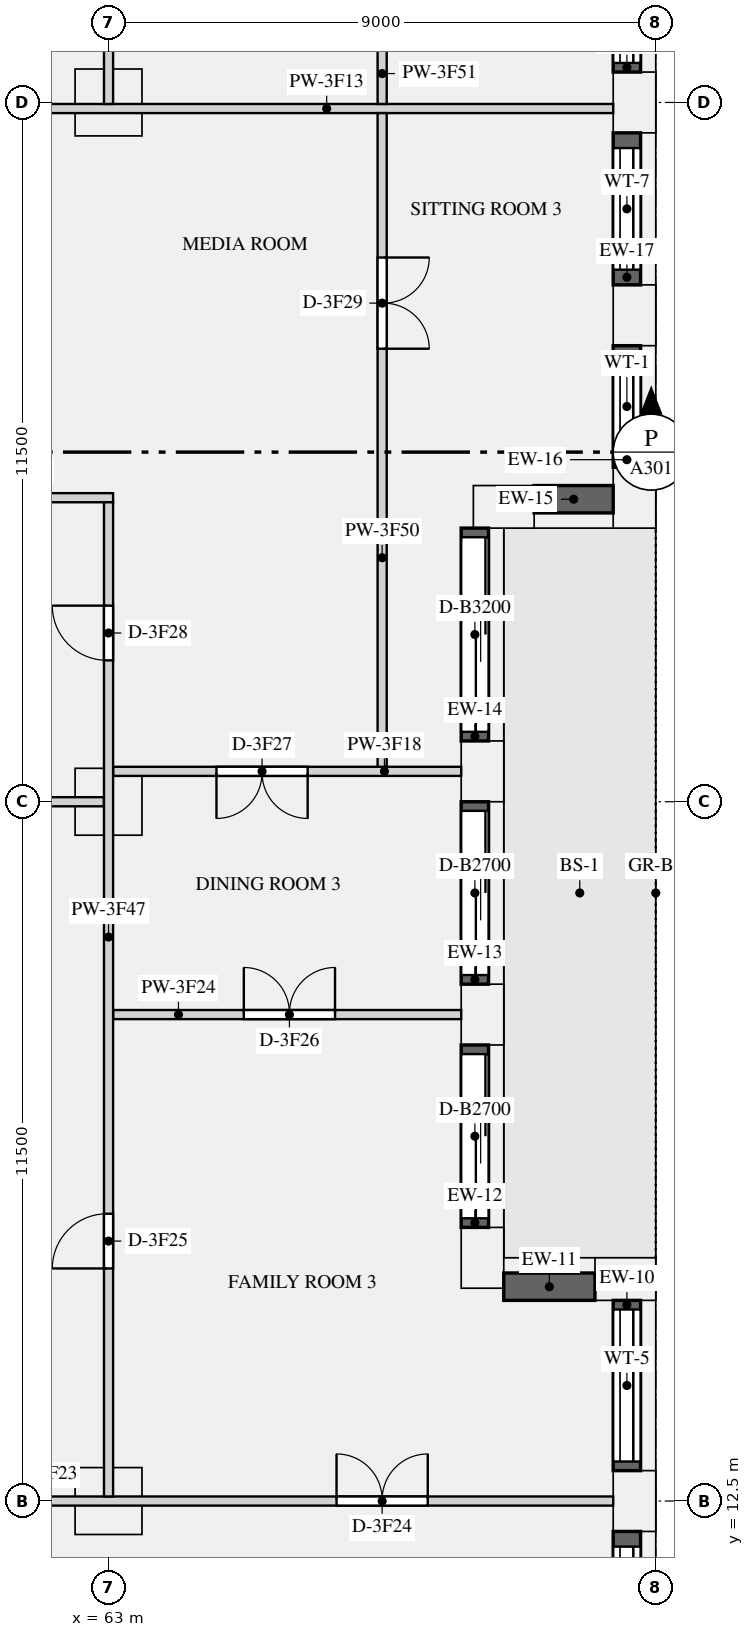
"""IFC4 building model, lengths in metres.
Left out: names, types, materials, properties, quantities, classifications, styles, units other than length and angle.
Written with IfcOpenShell. Run it as: python <this file> out.ifc"""

import sys

from ifc_helpers import new_model, si_unit, direction, frame, frame_2d, origin, origin_2d, place, context, subcontext, project, spatial, rectangle, extrude, element, fill, save


model = new_model("IFC4")
c1 = context("Model", 3, precision=1e-05, world=origin(), true_north=direction((0.0, 1.0)))
c2 = subcontext(c1, "Body", "Model", "MODEL_VIEW")
j1 = project(units=[si_unit("LENGTHUNIT", "METRE"), si_unit("PLANEANGLEUNIT", "RADIAN")], contexts=[c1])
p1 = place(None, origin())
s1 = spatial("IfcSite", under=j1, at=p1, CompositionType="ELEMENT")
p2 = place(p1, origin())
s2 = spatial("IfcBuilding", under=s1, at=p2, CompositionType="ELEMENT")
p3 = place(p2, frame((0.0, 0.0, 179.1)))
s3 = spatial("IfcBuildingStorey", under=s2, at=p3, CompositionType="ELEMENT", Elevation=179.1)
for number, where, z_axis, x_axis in (
    (1, (71.65, 12.5, 0.0), (0.0, 0.0, 1.0), (0.0, 1.0, 0.0)),
    (2, (71.5, 16.15, 0.0), (0.0, 0.0, 1.0), (-1.0, 0.0, 0.0)),
    (3, (69.15, 16.5, 0.0), (0.0, 0.0, 1.0), (0.0, 1.0, 0.0)),
    (4, (69.15, 20.5, 0.0), (0.0, 0.0, 1.0), (0.0, 1.0, 0.0)),
    (5, (69.15, 24.5, 0.0), (0.0, 0.0, 1.0), (0.0, 1.0, 0.0)),
    (6, (69.5, 28.85, 0.0), (0.0, 0.0, 1.0), (1.0, 0.0, 0.0)),
    (7, (71.65, 29.0, 0.0), (0.0, 0.0, 1.0), (0.0, 1.0, 0.0)),
    (8, (71.65, 32.0, 0.0), (0.0, 0.0, 1.0), (0.0, 1.0, 0.0)),
    (9, (71.65, 35.5, 0.0), (0.0, 0.0, 1.0), (0.0, 1.0, 0.0)),
):
    element("IfcColumn", number, at=place(p3, frame(where, z_axis=z_axis, x_axis=x_axis)), inside=s3, PredefinedType="USERDEFINED", context=c2, shape_type="SweptSolid", body=[
        extrude(rectangle(XDim=1.0, YDim=0.7, at=origin_2d()), origin(), (0.0, 0.0, 1.0), 3.15),
    ])
for number, where, z_axis, x_axis in (
    (10, (63.0, 24.0, 0.0), (0.0, 0.0, 1.0), (1.0, 0.0, 0.0)),
    (11, (63.0, 35.5, 0.0), (0.0, 0.0, 1.0), (1.0, 0.0, 0.0)),
    (12, (63.0, 12.5, 0.0), (0.0, 0.0, 1.0), (1.0, 0.0, 0.0)),
):
    element("IfcColumn", number, at=place(p3, frame(where, z_axis=z_axis, x_axis=x_axis)), inside=s3, PredefinedType="COLUMN", context=c2, shape_type="SweptSolid", body=[
        extrude(rectangle(XDim=1.1, YDim=1.1, at=origin_2d()), origin(), (0.0, 0.0, 1.0), 3.15),
    ])
p4 = place(p3, frame((71.525, 9.0, 0.9), z_axis=(0.0, 0.0, 1.0), x_axis=(0.0, 1.0, 0.0)))
e13 = element("IfcWall", 13, at=p4, inside=s3, PredefinedType="SOLIDWALL", context=c2, shape_type="SweptSolid", body=[
    extrude(rectangle(XDim=3.0, YDim=0.45, at=frame_2d((1.5, 0.0))), origin(), (0.0, 0.0, 1.0), 1.93),
])
p5 = place(p4, frame((0.25, 0.0, 0.15)))
e14 = element("IfcOpeningElement", 14, at=p5, cuts=e13, PredefinedType="OPENING", context=c2, shape_type="SweptSolid", body=[
    extrude(rectangle(XDim=2.5, YDim=1.5, at=frame_2d((1.25, 0.75))), frame((0.0, 0.235, 0.0), z_axis=(0.0, -1.0, 0.0), x_axis=(1.0, 0.0, 0.0)), (0.0, 0.0, 1.0), 0.47),
])
p6 = place(p3, frame((71.525, 13.0, 0.9), z_axis=(0.0, 0.0, 1.0), x_axis=(0.0, 1.0, 0.0)))
e15 = element("IfcWall", 15, at=p6, inside=s3, PredefinedType="SOLIDWALL", context=c2, shape_type="SweptSolid", body=[
    extrude(rectangle(XDim=2.8, YDim=0.45, at=frame_2d((1.4, 0.0))), origin(), (0.0, 0.0, 1.0), 1.93),
])
p7 = place(p6, frame((0.15, 0.0, 0.15)))
e16 = element("IfcOpeningElement", 16, at=p7, cuts=e15, PredefinedType="OPENING", context=c2, shape_type="SweptSolid", body=[
    extrude(rectangle(XDim=2.5, YDim=1.5, at=frame_2d((1.25, 0.75))), frame((0.0, 0.235, 0.0), z_axis=(0.0, -1.0, 0.0), x_axis=(1.0, 0.0, 0.0)), (0.0, 0.0, 1.0), 0.47),
])
p8 = place(p3, frame((71.0, 16.025, 0.9), z_axis=(0.0, 0.0, 1.0), x_axis=(-1.0, 0.0, 0.0)))
e17 = element("IfcWall", 17, at=p8, inside=s3, PredefinedType="SOLIDWALL", context=c2, shape_type="SweptSolid", body=[
    extrude(rectangle(XDim=1.5, YDim=0.45, at=frame_2d((0.75, 0.0))), origin(), (0.0, 0.0, 1.0), 1.93),
])
p9 = place(p3, frame((69.025, 17.0, 0.0), z_axis=(0.0, 0.0, 1.0), x_axis=(0.0, 1.0, 0.0)))
e18 = element("IfcWall", 18, at=p9, inside=s3, PredefinedType="SOLIDWALL", context=c2, shape_type="SweptSolid", body=[
    extrude(rectangle(XDim=3.0, YDim=0.45, at=frame_2d((1.5, 0.0))), origin(), (0.0, 0.0, 1.0), 2.83),
])
p10 = place(p9, frame((0.15, 0.0, 0.0)))
e19 = element("IfcOpeningElement", 19, at=p10, cuts=e18, PredefinedType="OPENING", context=c2, shape_type="SweptSolid", body=[
    extrude(rectangle(XDim=2.7, YDim=2.3, at=frame_2d((1.35, 1.15))), frame((0.0, 0.235, 0.0), z_axis=(0.0, -1.0, 0.0), x_axis=(1.0, 0.0, 0.0)), (0.0, 0.0, 1.0), 0.47),
])
p11 = place(p3, frame((69.025, 21.0, 0.0), z_axis=(0.0, 0.0, 1.0), x_axis=(0.0, 1.0, 0.0)))
e20 = element("IfcWall", 20, at=p11, inside=s3, PredefinedType="SOLIDWALL", context=c2, shape_type="SweptSolid", body=[
    extrude(rectangle(XDim=3.0, YDim=0.45, at=frame_2d((1.5, 0.0))), origin(), (0.0, 0.0, 1.0), 2.83),
])
p12 = place(p11, frame((0.15, 0.0, 0.0)))
e21 = element("IfcOpeningElement", 21, at=p12, cuts=e20, PredefinedType="OPENING", context=c2, shape_type="SweptSolid", body=[
    extrude(rectangle(XDim=2.7, YDim=2.3, at=frame_2d((1.35, 1.15))), frame((0.0, 0.235, 0.0), z_axis=(0.0, -1.0, 0.0), x_axis=(1.0, 0.0, 0.0)), (0.0, 0.0, 1.0), 0.47),
])
p13 = place(p3, frame((69.025, 25.0, 0.0), z_axis=(0.0, 0.0, 1.0), x_axis=(0.0, 1.0, 0.0)))
e22 = element("IfcWall", 22, at=p13, inside=s3, PredefinedType="SOLIDWALL", context=c2, shape_type="SweptSolid", body=[
    extrude(rectangle(XDim=3.5, YDim=0.45, at=frame_2d((1.75, 0.0))), origin(), (0.0, 0.0, 1.0), 2.83),
])
p14 = place(p13, frame((0.15, 0.0, 0.0)))
e23 = element("IfcOpeningElement", 23, at=p14, cuts=e22, PredefinedType="OPENING", context=c2, shape_type="SweptSolid", body=[
    extrude(rectangle(XDim=3.2, YDim=2.3, at=frame_2d((1.6, 1.15))), frame((0.0, 0.235, 0.0), z_axis=(0.0, -1.0, 0.0), x_axis=(1.0, 0.0, 0.0)), (0.0, 0.0, 1.0), 0.47),
])
p15 = place(p3, frame((70.0, 28.975, 0.9), z_axis=(0.0, 0.0, 1.0), x_axis=(1.0, 0.0, 0.0)))
e24 = element("IfcWall", 24, at=p15, inside=s3, PredefinedType="SOLIDWALL", context=c2, shape_type="SweptSolid", body=[
    extrude(rectangle(XDim=1.3, YDim=0.45, at=frame_2d((0.65, 0.0))), origin(), (0.0, 0.0, 1.0), 1.93),
])
p16 = place(p3, frame((71.525, 29.5, 0.9), z_axis=(0.0, 0.0, 1.0), x_axis=(0.0, 1.0, 0.0)))
e25 = element("IfcWall", 25, at=p16, inside=s3, PredefinedType="SOLIDWALL", context=c2, shape_type="SweptSolid", body=[
    extrude(rectangle(XDim=2.0, YDim=0.45, at=frame_2d((1.0, 0.0))), origin(), (0.0, 0.0, 1.0), 1.93),
])
p17 = place(p16, frame((0.25, 0.0, 0.15)))
e26 = element("IfcOpeningElement", 26, at=p17, cuts=e25, PredefinedType="OPENING", context=c2, shape_type="SweptSolid", body=[
    extrude(rectangle(XDim=1.5, YDim=1.5, at=frame_2d((0.75, 0.75))), frame((0.0, 0.235, 0.0), z_axis=(0.0, -1.0, 0.0), x_axis=(1.0, 0.0, 0.0)), (0.0, 0.0, 1.0), 0.47),
])
p18 = place(p3, frame((71.525, 32.5, 0.9), z_axis=(0.0, 0.0, 1.0), x_axis=(0.0, 1.0, 0.0)))
e27 = element("IfcWall", 27, at=p18, inside=s3, PredefinedType="SOLIDWALL", context=c2, shape_type="SweptSolid", body=[
    extrude(rectangle(XDim=2.5, YDim=0.45, at=frame_2d((1.25, 0.0))), origin(), (0.0, 0.0, 1.0), 1.93),
])
p19 = place(p18, frame((0.25, 0.0, 0.15)))
e28 = element("IfcOpeningElement", 28, at=p19, cuts=e27, PredefinedType="OPENING", context=c2, shape_type="SweptSolid", body=[
    extrude(rectangle(XDim=2.0, YDim=1.5, at=frame_2d((1.0, 0.75))), frame((0.0, 0.235, 0.0), z_axis=(0.0, -1.0, 0.0), x_axis=(1.0, 0.0, 0.0)), (0.0, 0.0, 1.0), 0.47),
])
p20 = place(p3, frame((71.525, 36.0, 0.9), z_axis=(0.0, 0.0, 1.0), x_axis=(0.0, 1.0, 0.0)))
e29 = element("IfcWall", 29, at=p20, inside=s3, PredefinedType="SOLIDWALL", context=c2, shape_type="SweptSolid", body=[
    extrude(rectangle(XDim=2.3, YDim=0.45, at=frame_2d((1.15, 0.0))), origin(), (0.0, 0.0, 1.0), 1.93),
])
p21 = place(p20, frame((0.15, 0.0, 0.15)))
e30 = element("IfcOpeningElement", 30, at=p21, cuts=e29, PredefinedType="OPENING", context=c2, shape_type="SweptSolid", body=[
    extrude(rectangle(XDim=2.0, YDim=1.5, at=frame_2d((1.0, 0.75))), frame((0.0, 0.235, 0.0), z_axis=(0.0, -1.0, 0.0), x_axis=(1.0, 0.0, 0.0)), (0.0, 0.0, 1.0), 0.47),
])
p22 = place(p3, frame((59.9, 24.0, 0.0), z_axis=(0.0, 0.0, 1.0), x_axis=(1.0, 0.0, 0.0)))
e31 = element("IfcWall", 31, at=p22, inside=s3, PredefinedType="PARTITIONING", context=c2, shape_type="SweptSolid", body=[
    extrude(rectangle(XDim=3.025, YDim=0.15, at=frame_2d((1.513, 0.0))), origin(), (0.0, 0.0, 1.0), 2.83),
])
p23 = place(p3, frame((59.8, 35.4, 0.0), z_axis=(0.0, 0.0, 1.0), x_axis=(1.0, 0.0, 0.0)))
e32 = element("IfcWall", 32, at=p23, inside=s3, PredefinedType="PARTITIONING", context=c2, shape_type="SweptSolid", body=[
    extrude(rectangle(XDim=11.5, YDim=0.15, at=frame_2d((5.75, 0.0))), origin(), (0.0, 0.0, 1.0), 2.83),
])
p24 = place(p23, frame((0.575, 0.0, 0.0)))
e33 = element("IfcOpeningElement", 33, at=p24, cuts=e32, PredefinedType="OPENING", context=c2, shape_type="SweptSolid", body=[
    extrude(rectangle(XDim=1.5, YDim=2.1, at=frame_2d((0.75, 1.05))), frame((0.0, 0.085, 0.0), z_axis=(0.0, -1.0, 0.0), x_axis=(1.0, 0.0, 0.0)), (0.0, 0.0, 1.0), 0.17),
])
p25 = place(p3, frame((63.075, 24.5, 0.0), z_axis=(0.0, 0.0, 1.0), x_axis=(1.0, 0.0, 0.0)))
e34 = element("IfcWall", 34, at=p25, inside=s3, PredefinedType="PARTITIONING", context=c2, shape_type="SweptSolid", body=[
    extrude(rectangle(XDim=5.725, YDim=0.15, at=frame_2d((2.863, 0.0))), origin(), (0.0, 0.0, 1.0), 2.83),
])
p26 = place(p25, frame((1.7, 0.0, 0.0)))
e35 = element("IfcOpeningElement", 35, at=p26, cuts=e34, PredefinedType="OPENING", context=c2, shape_type="SweptSolid", body=[
    extrude(rectangle(XDim=1.5, YDim=2.1, at=frame_2d((0.75, 1.05))), frame((0.0, 0.085, 0.0), z_axis=(0.0, -1.0, 0.0), x_axis=(1.0, 0.0, 0.0)), (0.0, 0.0, 1.0), 0.17),
])
p27 = place(p3, frame((54.0, 12.5, 0.0), z_axis=(0.0, 0.0, 1.0), x_axis=(1.0, 0.0, 0.0)))
e36 = element("IfcWall", 36, at=p27, inside=s3, PredefinedType="PARTITIONING", context=c2, shape_type="SweptSolid", body=[
    extrude(rectangle(XDim=17.3, YDim=0.15, at=frame_2d((8.65, 0.0))), origin(), (0.0, 0.0, 1.0), 2.83),
])
p28 = place(p27, frame((1.5, 0.0, 0.0)))
e37 = element("IfcOpeningElement", 37, at=p28, cuts=e36, PredefinedType="OPENING", context=c2, shape_type="SweptSolid", body=[
    extrude(rectangle(XDim=1.5, YDim=2.1, at=frame_2d((0.75, 1.05))), frame((0.0, 0.085, 0.0), z_axis=(0.0, -1.0, 0.0), x_axis=(1.0, 0.0, 0.0)), (0.0, 0.0, 1.0), 0.17),
])
p29 = place(p27, frame((12.75, 0.0, 0.0)))
e38 = element("IfcOpeningElement", 38, at=p29, cuts=e36, PredefinedType="OPENING", context=c2, shape_type="SweptSolid", body=[
    extrude(rectangle(XDim=1.5, YDim=2.1, at=frame_2d((0.75, 1.05))), frame((0.0, 0.085, 0.0), z_axis=(0.0, -1.0, 0.0), x_axis=(1.0, 0.0, 0.0)), (0.0, 0.0, 1.0), 0.17),
])
p30 = place(p3, frame((63.075, 20.5, 0.0), z_axis=(0.0, 0.0, 1.0), x_axis=(1.0, 0.0, 0.0)))
e39 = element("IfcWall", 39, at=p30, inside=s3, PredefinedType="PARTITIONING", context=c2, shape_type="SweptSolid", body=[
    extrude(rectangle(XDim=5.725, YDim=0.15, at=frame_2d((2.863, 0.0))), origin(), (0.0, 0.0, 1.0), 2.83),
])
p31 = place(p30, frame((2.15, 0.0, 0.0)))
e40 = element("IfcOpeningElement", 40, at=p31, cuts=e39, PredefinedType="OPENING", context=c2, shape_type="SweptSolid", body=[
    extrude(rectangle(XDim=1.5, YDim=2.1, at=frame_2d((0.75, 1.05))), frame((0.0, 0.085, 0.0), z_axis=(0.0, -1.0, 0.0), x_axis=(1.0, 0.0, 0.0)), (0.0, 0.0, 1.0), 0.17),
])
p32 = place(p3, frame((59.8, 29.0, 0.0), z_axis=(0.0, 0.0, 1.0), x_axis=(1.0, 0.0, 0.0)))
e41 = element("IfcWall", 41, at=p32, inside=s3, PredefinedType="PARTITIONING", context=c2, shape_type="SweptSolid", body=[
    extrude(rectangle(XDim=3.275, YDim=0.15, at=frame_2d((1.637, 0.0))), origin(), (0.0, 0.0, 1.0), 2.83),
])
p33 = place(p3, frame((63.0, 12.575, 0.0), z_axis=(0.0, 0.0, 1.0), x_axis=(0.0, 1.0, 0.0)))
e42 = element("IfcWall", 42, at=p33, inside=s3, PredefinedType="PARTITIONING", context=c2, shape_type="SweptSolid", body=[
    extrude(rectangle(XDim=16.35, YDim=0.15, at=frame_2d((8.175, 0.0))), origin(), (0.0, 0.0, 1.0), 2.83),
])
p34 = place(p33, frame((3.75, 0.0, 0.0)))
e43 = element("IfcOpeningElement", 43, at=p34, cuts=e42, PredefinedType="OPENING", context=c2, shape_type="SweptSolid", body=[
    extrude(rectangle(XDim=0.9, YDim=2.1, at=frame_2d((0.45, 1.05))), frame((0.0, 0.085, 0.0), z_axis=(0.0, -1.0, 0.0), x_axis=(1.0, 0.0, 0.0)), (0.0, 0.0, 1.0), 0.17),
])
p35 = place(p33, frame((13.75, 0.0, 0.0)))
e44 = element("IfcOpeningElement", 44, at=p35, cuts=e42, PredefinedType="OPENING", context=c2, shape_type="SweptSolid", body=[
    extrude(rectangle(XDim=0.9, YDim=2.1, at=frame_2d((0.45, 1.05))), frame((0.0, 0.085, 0.0), z_axis=(0.0, -1.0, 0.0), x_axis=(1.0, 0.0, 0.0)), (0.0, 0.0, 1.0), 0.17),
])
p36 = place(p3, frame((63.0, 35.475, 0.0), z_axis=(0.0, 0.0, 1.0), x_axis=(0.0, 1.0, 0.0)))
e45 = element("IfcWall", 45, at=p36, inside=s3, PredefinedType="PARTITIONING", context=c2, shape_type="SweptSolid", body=[
    extrude(rectangle(XDim=7.325, YDim=0.15, at=frame_2d((3.663, 0.0))), origin(), (0.0, 0.0, 1.0), 2.83),
])
p37 = place(p36, frame((3.575, 0.0, 0.0)))
e46 = element("IfcOpeningElement", 46, at=p37, cuts=e45, PredefinedType="OPENING", context=c2, shape_type="SweptSolid", body=[
    extrude(rectangle(XDim=0.9, YDim=2.1, at=frame_2d((0.45, 1.05))), frame((0.0, 0.085, 0.0), z_axis=(0.0, -1.0, 0.0), x_axis=(1.0, 0.0, 0.0)), (0.0, 0.0, 1.0), 0.17),
])
p38 = place(p3, frame((67.5, 24.575, 0.0), z_axis=(0.0, 0.0, 1.0), x_axis=(0.0, 1.0, 0.0)))
e47 = element("IfcWall", 47, at=p38, inside=s3, PredefinedType="PARTITIONING", context=c2, shape_type="SweptSolid", body=[
    extrude(rectangle(XDim=10.75, YDim=0.15, at=frame_2d((5.375, 0.0))), origin(), (0.0, 0.0, 1.0), 2.83),
])
p39 = place(p38, frame((6.875, 0.0, 0.0)))
e48 = element("IfcOpeningElement", 48, at=p39, cuts=e47, PredefinedType="OPENING", context=c2, shape_type="SweptSolid", body=[
    extrude(rectangle(XDim=1.5, YDim=2.1, at=frame_2d((0.75, 1.05))), frame((0.0, 0.085, 0.0), z_axis=(0.0, -1.0, 0.0), x_axis=(1.0, 0.0, 0.0)), (0.0, 0.0, 1.0), 0.17),
])
p40 = place(p3, frame((67.5, 35.475, 0.0), z_axis=(0.0, 0.0, 1.0), x_axis=(0.0, 1.0, 0.0)))
e49 = element("IfcWall", 49, at=p40, inside=s3, PredefinedType="PARTITIONING", context=c2, shape_type="SweptSolid", body=[
    extrude(rectangle(XDim=2.825, YDim=0.15, at=frame_2d((1.413, 0.0))), origin(), (0.0, 0.0, 1.0), 2.83),
])
p41 = place(p40, frame((1.0, 0.0, 0.0)))
e50 = element("IfcOpeningElement", 50, at=p41, cuts=e49, PredefinedType="OPENING", context=c2, shape_type="SweptSolid", body=[
    extrude(rectangle(XDim=0.9, YDim=2.1, at=frame_2d((0.45, 1.05))), frame((0.0, 0.085, 0.0), z_axis=(0.0, -1.0, 0.0), x_axis=(1.0, 0.0, 0.0)), (0.0, 0.0, 1.0), 0.17),
])
p42 = place(p5, origin())
e51 = element("IfcWindow", 51, at=p42, inside=s3, PartitioningType="SINGLE_PANEL", PredefinedType="WINDOW", context=c2, shape_type="SweptSolid", body=[
    extrude(rectangle(XDim=2.5, YDim=1.5, at=frame_2d((1.25, 0.75))), frame((0.0, -0.065, 0.0), z_axis=(0.0, -1.0, 0.0), x_axis=(1.0, 0.0, 0.0)), (0.0, 0.0, 1.0), 0.06),
])
fill(e14, e51)
p43 = place(p7, origin())
e52 = element("IfcWindow", 52, at=p43, inside=s3, PartitioningType="SINGLE_PANEL", PredefinedType="WINDOW", context=c2, shape_type="SweptSolid", body=[
    extrude(rectangle(XDim=2.5, YDim=1.5, at=frame_2d((1.25, 0.75))), frame((0.0, -0.065, 0.0), z_axis=(0.0, -1.0, 0.0), x_axis=(1.0, 0.0, 0.0)), (0.0, 0.0, 1.0), 0.06),
])
fill(e16, e52)
p44 = place(p10, origin())
e53 = element("IfcDoor", 53, at=p44, inside=s3, OperationType="SLIDING_TO_LEFT", PredefinedType="DOOR", context=c2, shape_type="SweptSolid", body=[
    extrude(rectangle(XDim=2.7, YDim=2.3, at=frame_2d((1.35, 1.15))), frame((0.0, -0.07, 0.0), z_axis=(0.0, -1.0, 0.0), x_axis=(1.0, 0.0, 0.0)), (0.0, 0.0, 1.0), 0.05),
])
fill(e19, e53)
p45 = place(p12, origin())
e54 = element("IfcDoor", 54, at=p45, inside=s3, OperationType="SLIDING_TO_LEFT", PredefinedType="DOOR", context=c2, shape_type="SweptSolid", body=[
    extrude(rectangle(XDim=2.7, YDim=2.3, at=frame_2d((1.35, 1.15))), frame((0.0, -0.07, 0.0), z_axis=(0.0, -1.0, 0.0), x_axis=(1.0, 0.0, 0.0)), (0.0, 0.0, 1.0), 0.05),
])
fill(e21, e54)
p46 = place(p14, origin())
e55 = element("IfcDoor", 55, at=p46, inside=s3, OperationType="SLIDING_TO_LEFT", PredefinedType="DOOR", context=c2, shape_type="SweptSolid", body=[
    extrude(rectangle(XDim=3.2, YDim=2.3, at=frame_2d((1.6, 1.15))), frame((0.0, -0.07, 0.0), z_axis=(0.0, -1.0, 0.0), x_axis=(1.0, 0.0, 0.0)), (0.0, 0.0, 1.0), 0.05),
])
fill(e23, e55)
p47 = place(p17, origin())
e56 = element("IfcWindow", 56, at=p47, inside=s3, PartitioningType="SINGLE_PANEL", PredefinedType="WINDOW", context=c2, shape_type="SweptSolid", body=[
    extrude(rectangle(XDim=1.5, YDim=1.5, at=frame_2d((0.75, 0.75))), frame((0.0, -0.065, 0.0), z_axis=(0.0, -1.0, 0.0), x_axis=(1.0, 0.0, 0.0)), (0.0, 0.0, 1.0), 0.06),
])
fill(e26, e56)
p48 = place(p19, origin())
e57 = element("IfcWindow", 57, at=p48, inside=s3, PartitioningType="SINGLE_PANEL", PredefinedType="WINDOW", context=c2, shape_type="SweptSolid", body=[
    extrude(rectangle(XDim=2.0, YDim=1.5, at=frame_2d((1.0, 0.75))), frame((0.0, -0.065, 0.0), z_axis=(0.0, -1.0, 0.0), x_axis=(1.0, 0.0, 0.0)), (0.0, 0.0, 1.0), 0.06),
])
fill(e28, e57)
p49 = place(p21, origin())
e58 = element("IfcWindow", 58, at=p49, inside=s3, PartitioningType="SINGLE_PANEL", PredefinedType="WINDOW", context=c2, shape_type="SweptSolid", body=[
    extrude(rectangle(XDim=2.0, YDim=1.5, at=frame_2d((1.0, 0.75))), frame((0.0, -0.065, 0.0), z_axis=(0.0, -1.0, 0.0), x_axis=(1.0, 0.0, 0.0)), (0.0, 0.0, 1.0), 0.06),
])
fill(e30, e58)
p50 = place(p29, origin())
e59 = element("IfcDoor", 59, at=p50, inside=s3, OperationType="DOUBLE_DOOR_SINGLE_SWING", PredefinedType="DOOR", context=c2, shape_type="SweptSolid", body=[
    extrude(rectangle(XDim=1.5, YDim=2.1, at=frame_2d((0.75, 1.05))), frame((0.0, 0.025, 0.0), z_axis=(0.0, -1.0, 0.0), x_axis=(1.0, 0.0, 0.0)), (0.0, 0.0, 1.0), 0.05),
])
fill(e38, e59)
p51 = place(p34, origin())
e60 = element("IfcDoor", 60, at=p51, inside=s3, OperationType="SINGLE_SWING_LEFT", PredefinedType="DOOR", context=c2, shape_type="SweptSolid", body=[
    extrude(rectangle(XDim=0.9, YDim=2.1, at=frame_2d((0.45, 1.05))), frame((0.0, 0.025, 0.0), z_axis=(0.0, -1.0, 0.0), x_axis=(1.0, 0.0, 0.0)), (0.0, 0.0, 1.0), 0.05),
])
fill(e43, e60)
p52 = place(p31, origin())
e61 = element("IfcDoor", 61, at=p52, inside=s3, OperationType="DOUBLE_DOOR_SINGLE_SWING", PredefinedType="DOOR", context=c2, shape_type="SweptSolid", body=[
    extrude(rectangle(XDim=1.5, YDim=2.1, at=frame_2d((0.75, 1.05))), frame((0.0, 0.025, 0.0), z_axis=(0.0, -1.0, 0.0), x_axis=(1.0, 0.0, 0.0)), (0.0, 0.0, 1.0), 0.05),
])
fill(e40, e61)
p53 = place(p26, frame((1.5, 0.0, 0.0), z_axis=(0.0, 0.0, 1.0), x_axis=(-1.0, 0.0, 0.0)))
e62 = element("IfcDoor", 62, at=p53, inside=s3, OperationType="DOUBLE_DOOR_SINGLE_SWING", PredefinedType="DOOR", context=c2, shape_type="SweptSolid", body=[
    extrude(rectangle(XDim=1.5, YDim=2.1, at=frame_2d((0.75, 1.05))), frame((0.0, 0.025, 0.0), z_axis=(0.0, -1.0, 0.0), x_axis=(1.0, 0.0, 0.0)), (0.0, 0.0, 1.0), 0.05),
])
fill(e35, e62)
p54 = place(p35, origin())
e63 = element("IfcDoor", 63, at=p54, inside=s3, OperationType="SINGLE_SWING_RIGHT", PredefinedType="DOOR", context=c2, shape_type="SweptSolid", body=[
    extrude(rectangle(XDim=0.9, YDim=2.1, at=frame_2d((0.45, 1.05))), frame((0.0, 0.025, 0.0), z_axis=(0.0, -1.0, 0.0), x_axis=(1.0, 0.0, 0.0)), (0.0, 0.0, 1.0), 0.05),
])
fill(e44, e63)
p55 = place(p39, frame((1.5, 0.0, 0.0), z_axis=(0.0, 0.0, 1.0), x_axis=(-1.0, 0.0, 0.0)))
e64 = element("IfcDoor", 64, at=p55, inside=s3, OperationType="DOUBLE_DOOR_SINGLE_SWING", PredefinedType="DOOR", context=c2, shape_type="SweptSolid", body=[
    extrude(rectangle(XDim=1.5, YDim=2.1, at=frame_2d((0.75, 1.05))), frame((0.0, 0.025, 0.0), z_axis=(0.0, -1.0, 0.0), x_axis=(1.0, 0.0, 0.0)), (0.0, 0.0, 1.0), 0.05),
])
fill(e48, e64)
save(model, sys.argv[1])
